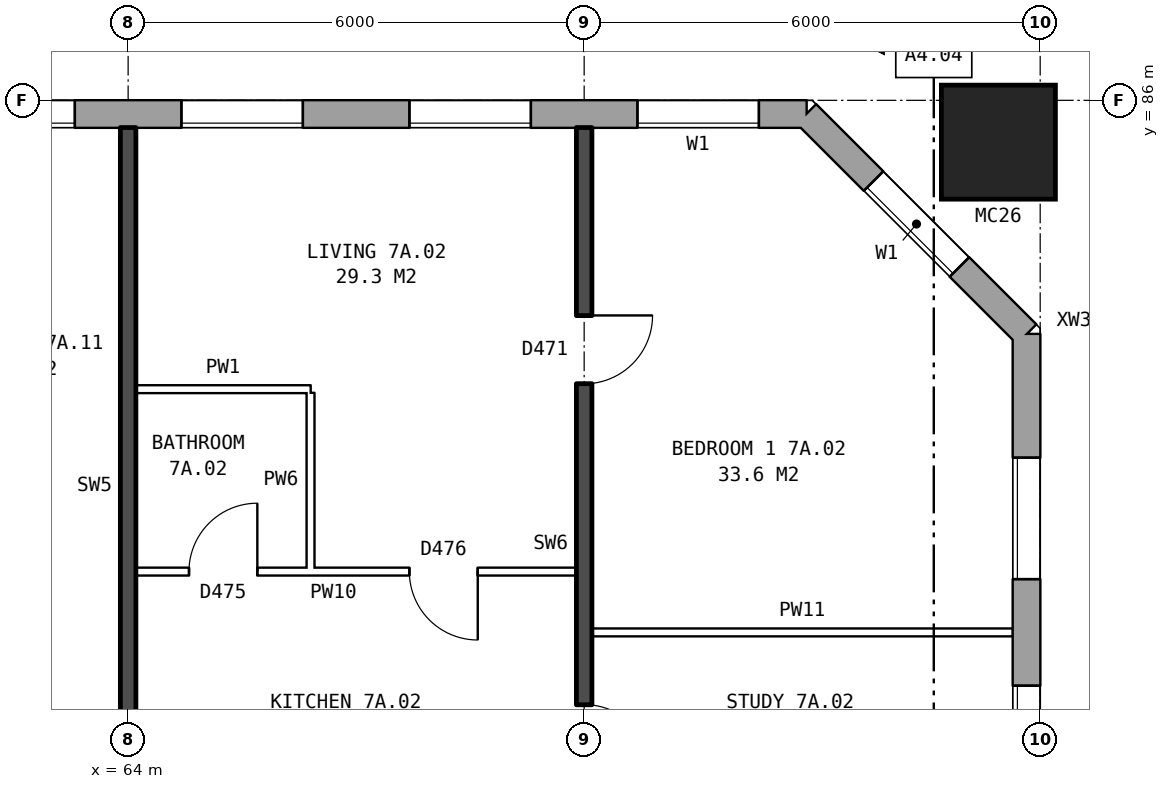
"""IFC4 building model, lengths in metres.
Left out: names, types, materials, properties, quantities, classifications, styles, units other than length and angle.
Written with IfcOpenShell. Run it as: python <this file> out.ifc"""

import sys

from ifc_helpers import new_model, si_unit, direction, frame, frame_2d, origin, origin_2d, place, context, subcontext, project, spatial, rectangle, hollow_rectangle, extrude, element, fill, save


model = new_model("IFC4")
c1 = context("Model", 3, precision=1e-05, world=origin(), true_north=direction((0.0, 1.0)))
c2 = subcontext(c1, "Body", "Model", "MODEL_VIEW")
j1 = project(units=[si_unit("LENGTHUNIT", "METRE"), si_unit("PLANEANGLEUNIT", "RADIAN")], contexts=[c1])
p1 = place(None, origin())
s1 = spatial("IfcSite", under=j1, at=p1, CompositionType="ELEMENT")
p2 = place(p1, origin())
s2 = spatial("IfcBuilding", under=s1, at=p2, CompositionType="ELEMENT")
p3 = place(p2, frame((0.0, 0.0, 28.8)))
s3 = spatial("IfcBuildingStorey", under=s2, at=p3, CompositionType="ELEMENT", Elevation=28.8)
p4 = place(p3, frame((75.45, 85.45, 0.0), z_axis=(0.0, 0.0, 1.0), x_axis=(1.0, 0.0, 0.0)))
e1 = element("IfcColumn", 1, at=p4, inside=s3, PredefinedType="COLUMN", context=c2, shape_type="SweptSolid", body=[
    extrude(hollow_rectangle(XDim=1.5, YDim=1.5, WallThickness=0.08, at=origin_2d()), origin(), (0.0, 0.0, 1.0), 3.1),
])
p5 = place(p3, frame((75.82, 57.075, 0.0), z_axis=(0.0, 0.0, 1.0), x_axis=(0.0, 1.0, 0.0)))
e2 = element("IfcWall", 2, at=p5, inside=s3, PredefinedType="STANDARD", context=c2, shape_type="SweptSolid", body=[
    extrude(rectangle(XDim=25.851, YDim=0.36, at=frame_2d((12.925, 0.0))), origin(), (0.0, 0.0, 1.0), 2.85),
])
p6 = place(p5, frame((1.625, 0.0, 0.8)))
e3 = element("IfcOpeningElement", 3, at=p6, cuts=e2, PredefinedType="OPENING", context=c2, shape_type="SweptSolid", body=[
    extrude(rectangle(XDim=1.6, YDim=1.8, at=frame_2d((0.8, 0.9))), frame((0.0, 0.19, 0.0), z_axis=(0.0, -1.0, 0.0), x_axis=(1.0, 0.0, 0.0)), (0.0, 0.0, 1.0), 0.38),
])
p7 = place(p5, frame((4.625, 0.0, 0.8)))
e4 = element("IfcOpeningElement", 4, at=p7, cuts=e2, PredefinedType="OPENING", context=c2, shape_type="SweptSolid", body=[
    extrude(rectangle(XDim=1.6, YDim=1.8, at=frame_2d((0.8, 0.9))), frame((0.0, 0.19, 0.0), z_axis=(0.0, -1.0, 0.0), x_axis=(1.0, 0.0, 0.0)), (0.0, 0.0, 1.0), 0.38),
])
p8 = place(p5, frame((19.625, 0.0, 0.8)))
e5 = element("IfcOpeningElement", 5, at=p8, cuts=e2, PredefinedType="OPENING", context=c2, shape_type="SweptSolid", body=[
    extrude(rectangle(XDim=1.6, YDim=1.8, at=frame_2d((0.8, 0.9))), frame((0.0, 0.19, 0.0), z_axis=(0.0, -1.0, 0.0), x_axis=(1.0, 0.0, 0.0)), (0.0, 0.0, 1.0), 0.38),
])
p9 = place(p5, frame((22.625, 0.0, 0.8)))
e6 = element("IfcOpeningElement", 6, at=p9, cuts=e2, PredefinedType="OPENING", context=c2, shape_type="SweptSolid", body=[
    extrude(rectangle(XDim=1.6, YDim=1.8, at=frame_2d((0.8, 0.9))), frame((0.0, 0.19, 0.0), z_axis=(0.0, -1.0, 0.0), x_axis=(1.0, 0.0, 0.0)), (0.0, 0.0, 1.0), 0.38),
])
p10 = place(p3, frame((75.82, 82.925, 0.0), z_axis=(0.0, 0.0, 1.0), x_axis=(-0.707106781187, 0.707106781187, 0.0)))
e7 = element("IfcWall", 7, at=p10, inside=s3, PredefinedType="STANDARD", context=c2, shape_type="SweptSolid", body=[
    extrude(rectangle(XDim=4.094, YDim=0.36, at=frame_2d((2.047, 0.0))), origin(), (0.0, 0.0, 1.0), 2.85),
])
p11 = place(p10, frame((1.247, 0.0, 0.8)))
e8 = element("IfcOpeningElement", 8, at=p11, cuts=e7, PredefinedType="OPENING", context=c2, shape_type="SweptSolid", body=[
    extrude(rectangle(XDim=1.6, YDim=1.8, at=frame_2d((0.8, 0.9))), frame((0.0, 0.19, 0.0), z_axis=(0.0, -1.0, 0.0), x_axis=(1.0, 0.0, 0.0)), (0.0, 0.0, 1.0), 0.38),
])
p12 = place(p3, frame((72.925, 85.82, 0.0), z_axis=(0.0, 0.0, 1.0), x_axis=(-1.0, 0.0, 0.0)))
e9 = element("IfcWall", 9, at=p12, inside=s3, PredefinedType="STANDARD", context=c2, shape_type="SweptSolid", body=[
    extrude(rectangle(XDim=50.101, YDim=0.36, at=frame_2d((25.05, 0.0))), origin(), (0.0, 0.0, 1.0), 2.85),
])
p13 = place(p12, frame((0.625, 0.0, 0.8)))
e10 = element("IfcOpeningElement", 10, at=p13, cuts=e9, PredefinedType="OPENING", context=c2, shape_type="SweptSolid", body=[
    extrude(rectangle(XDim=1.6, YDim=1.8, at=frame_2d((0.8, 0.9))), frame((0.0, 0.19, 0.0), z_axis=(0.0, -1.0, 0.0), x_axis=(1.0, 0.0, 0.0)), (0.0, 0.0, 1.0), 0.38),
])
p14 = place(p12, frame((3.625, 0.0, 0.8)))
e11 = element("IfcOpeningElement", 11, at=p14, cuts=e9, PredefinedType="OPENING", context=c2, shape_type="SweptSolid", body=[
    extrude(rectangle(XDim=1.6, YDim=1.8, at=frame_2d((0.8, 0.9))), frame((0.0, 0.19, 0.0), z_axis=(0.0, -1.0, 0.0), x_axis=(1.0, 0.0, 0.0)), (0.0, 0.0, 1.0), 0.38),
])
p15 = place(p12, frame((6.625, 0.0, 0.8)))
e12 = element("IfcOpeningElement", 12, at=p15, cuts=e9, PredefinedType="OPENING", context=c2, shape_type="SweptSolid", body=[
    extrude(rectangle(XDim=1.6, YDim=1.8, at=frame_2d((0.8, 0.9))), frame((0.0, 0.19, 0.0), z_axis=(0.0, -1.0, 0.0), x_axis=(1.0, 0.0, 0.0)), (0.0, 0.0, 1.0), 0.38),
])
p16 = place(p12, frame((9.625, 0.0, 0.8)))
e13 = element("IfcOpeningElement", 13, at=p16, cuts=e9, PredefinedType="OPENING", context=c2, shape_type="SweptSolid", body=[
    extrude(rectangle(XDim=1.6, YDim=1.8, at=frame_2d((0.8, 0.9))), frame((0.0, 0.19, 0.0), z_axis=(0.0, -1.0, 0.0), x_axis=(1.0, 0.0, 0.0)), (0.0, 0.0, 1.0), 0.38),
])
p17 = place(p12, frame((12.075, 0.0, 1.65)))
e14 = element("IfcOpeningElement", 14, at=p17, cuts=e9, PredefinedType="OPENING", context=c2, shape_type="SweptSolid", body=[
    extrude(rectangle(XDim=1.2, YDim=0.9, at=frame_2d((0.6, 0.45))), frame((0.0, 0.19, 0.0), z_axis=(0.0, -1.0, 0.0), x_axis=(1.0, 0.0, 0.0)), (0.0, 0.0, 1.0), 0.38),
])
p18 = place(p12, frame((15.325, 0.0, 0.8)))
e15 = element("IfcOpeningElement", 15, at=p18, cuts=e9, PredefinedType="OPENING", context=c2, shape_type="SweptSolid", body=[
    extrude(rectangle(XDim=0.6, YDim=1.2, at=frame_2d((0.3, 0.6))), frame((0.0, 0.19, 0.0), z_axis=(0.0, -1.0, 0.0), x_axis=(1.0, 0.0, 0.0)), (0.0, 0.0, 1.0), 0.38),
])
p19 = place(p12, frame((18.625, 0.0, 0.8)))
e16 = element("IfcOpeningElement", 16, at=p19, cuts=e9, PredefinedType="OPENING", context=c2, shape_type="SweptSolid", body=[
    extrude(rectangle(XDim=1.6, YDim=1.8, at=frame_2d((0.8, 0.9))), frame((0.0, 0.19, 0.0), z_axis=(0.0, -1.0, 0.0), x_axis=(1.0, 0.0, 0.0)), (0.0, 0.0, 1.0), 0.38),
])
p20 = place(p12, frame((21.625, 0.0, 0.8)))
e17 = element("IfcOpeningElement", 17, at=p20, cuts=e9, PredefinedType="OPENING", context=c2, shape_type="SweptSolid", body=[
    extrude(rectangle(XDim=1.6, YDim=1.8, at=frame_2d((0.8, 0.9))), frame((0.0, 0.19, 0.0), z_axis=(0.0, -1.0, 0.0), x_axis=(1.0, 0.0, 0.0)), (0.0, 0.0, 1.0), 0.38),
])
p21 = place(p12, frame((24.625, 0.0, 0.8)))
e18 = element("IfcOpeningElement", 18, at=p21, cuts=e9, PredefinedType="OPENING", context=c2, shape_type="SweptSolid", body=[
    extrude(rectangle(XDim=1.6, YDim=1.8, at=frame_2d((0.8, 0.9))), frame((0.0, 0.19, 0.0), z_axis=(0.0, -1.0, 0.0), x_axis=(1.0, 0.0, 0.0)), (0.0, 0.0, 1.0), 0.38),
])
p22 = place(p12, frame((27.625, 0.0, 0.8)))
e19 = element("IfcOpeningElement", 19, at=p22, cuts=e9, PredefinedType="OPENING", context=c2, shape_type="SweptSolid", body=[
    extrude(rectangle(XDim=1.6, YDim=1.8, at=frame_2d((0.8, 0.9))), frame((0.0, 0.19, 0.0), z_axis=(0.0, -1.0, 0.0), x_axis=(1.0, 0.0, 0.0)), (0.0, 0.0, 1.0), 0.38),
])
p23 = place(p12, frame((30.625, 0.0, 0.8)))
e20 = element("IfcOpeningElement", 20, at=p23, cuts=e9, PredefinedType="OPENING", context=c2, shape_type="SweptSolid", body=[
    extrude(rectangle(XDim=1.6, YDim=1.8, at=frame_2d((0.8, 0.9))), frame((0.0, 0.19, 0.0), z_axis=(0.0, -1.0, 0.0), x_axis=(1.0, 0.0, 0.0)), (0.0, 0.0, 1.0), 0.38),
])
p24 = place(p12, frame((33.125, 0.0, 0.8)))
e21 = element("IfcOpeningElement", 21, at=p24, cuts=e9, PredefinedType="OPENING", context=c2, shape_type="SweptSolid", body=[
    extrude(rectangle(XDim=1.2, YDim=1.5, at=frame_2d((0.6, 0.75))), frame((0.0, 0.19, 0.0), z_axis=(0.0, -1.0, 0.0), x_axis=(1.0, 0.0, 0.0)), (0.0, 0.0, 1.0), 0.38),
])
p25 = place(p12, frame((36.675, 0.0, 1.7)))
e22 = element("IfcOpeningElement", 22, at=p25, cuts=e9, PredefinedType="OPENING", context=c2, shape_type="SweptSolid", body=[
    extrude(rectangle(XDim=0.6, YDim=0.9, at=frame_2d((0.3, 0.45))), frame((0.0, 0.19, 0.0), z_axis=(0.0, -1.0, 0.0), x_axis=(1.0, 0.0, 0.0)), (0.0, 0.0, 1.0), 0.38),
])
p26 = place(p12, frame((39.625, 0.0, 0.8)))
e23 = element("IfcOpeningElement", 23, at=p26, cuts=e9, PredefinedType="OPENING", context=c2, shape_type="SweptSolid", body=[
    extrude(rectangle(XDim=1.6, YDim=1.8, at=frame_2d((0.8, 0.9))), frame((0.0, 0.19, 0.0), z_axis=(0.0, -1.0, 0.0), x_axis=(1.0, 0.0, 0.0)), (0.0, 0.0, 1.0), 0.38),
])
p27 = place(p12, frame((42.625, 0.0, 0.8)))
e24 = element("IfcOpeningElement", 24, at=p27, cuts=e9, PredefinedType="OPENING", context=c2, shape_type="SweptSolid", body=[
    extrude(rectangle(XDim=1.6, YDim=1.8, at=frame_2d((0.8, 0.9))), frame((0.0, 0.19, 0.0), z_axis=(0.0, -1.0, 0.0), x_axis=(1.0, 0.0, 0.0)), (0.0, 0.0, 1.0), 0.38),
])
p28 = place(p12, frame((45.625, 0.0, 0.8)))
e25 = element("IfcOpeningElement", 25, at=p28, cuts=e9, PredefinedType="OPENING", context=c2, shape_type="SweptSolid", body=[
    extrude(rectangle(XDim=1.6, YDim=1.8, at=frame_2d((0.8, 0.9))), frame((0.0, 0.19, 0.0), z_axis=(0.0, -1.0, 0.0), x_axis=(1.0, 0.0, 0.0)), (0.0, 0.0, 1.0), 0.38),
])
p29 = place(p12, frame((13.875, 0.0, 0.15)))
e26 = element("IfcOpeningElement", 26, at=p29, cuts=e9, PredefinedType="OPENING", context=c2, shape_type="SweptSolid", body=[
    extrude(rectangle(XDim=0.8, YDim=0.9, at=frame_2d((0.4, 0.45))), frame((0.0, 0.19, 0.0), z_axis=(0.0, -1.0, 0.0), x_axis=(1.0, 0.0, 0.0)), (0.0, 0.0, 1.0), 0.38),
])
p30 = place(p12, frame((16.225, 0.0, 0.8)))
e27 = element("IfcOpeningElement", 27, at=p30, cuts=e9, PredefinedType="OPENING", context=c2, shape_type="SweptSolid", body=[
    extrude(rectangle(XDim=1.4, YDim=1.8, at=frame_2d((0.7, 0.9))), frame((0.0, 0.19, 0.0), z_axis=(0.0, -1.0, 0.0), x_axis=(1.0, 0.0, 0.0)), (0.0, 0.0, 1.0), 0.38),
])
p31 = place(p12, frame((34.625, 0.0, 0.8)))
e28 = element("IfcOpeningElement", 28, at=p31, cuts=e9, PredefinedType="OPENING", context=c2, shape_type="SweptSolid", body=[
    extrude(rectangle(XDim=0.6, YDim=0.9, at=frame_2d((0.3, 0.45))), frame((0.0, 0.19, 0.0), z_axis=(0.0, -1.0, 0.0), x_axis=(1.0, 0.0, 0.0)), (0.0, 0.0, 1.0), 0.38),
])
p32 = place(p12, frame((37.575, 0.0, 1.1)))
e29 = element("IfcOpeningElement", 29, at=p32, cuts=e9, PredefinedType="OPENING", context=c2, shape_type="SweptSolid", body=[
    extrude(rectangle(XDim=1.0, YDim=1.5, at=frame_2d((0.5, 0.75))), frame((0.0, 0.19, 0.0), z_axis=(0.0, -1.0, 0.0), x_axis=(1.0, 0.0, 0.0)), (0.0, 0.0, 1.0), 0.38),
])
p33 = place(p3, frame((70.1, 79.0, 0.0), z_axis=(0.0, 0.0, 1.0), x_axis=(1.0, 0.0, 0.0)))
e30 = element("IfcWall", 30, at=p33, inside=s3, PredefinedType="PARTITIONING", context=c2, shape_type="SweptSolid", body=[
    extrude(rectangle(XDim=5.54, YDim=0.1, at=frame_2d((2.77, 0.0))), origin(), (0.0, 0.0, 1.0), 2.85),
])
p34 = place(p3, frame((64.1, 79.8, 0.0), z_axis=(0.0, 0.0, 1.0), x_axis=(1.0, 0.0, 0.0)))
e31 = element("IfcWall", 31, at=p34, inside=s3, PredefinedType="PARTITIONING", context=c2, shape_type="SweptSolid", body=[
    extrude(rectangle(XDim=5.8, YDim=0.1, at=frame_2d((2.9, 0.0))), origin(), (0.0, 0.0, 1.0), 2.85),
])
p35 = place(p34, frame((3.6, 0.0, 0.0)))
e32 = element("IfcOpeningElement", 32, at=p35, cuts=e31, PredefinedType="OPENING", context=c2, shape_type="SweptSolid", body=[
    extrude(rectangle(XDim=0.9, YDim=2.1, at=frame_2d((0.45, 1.05))), frame((0.0, 0.06, 0.0), z_axis=(0.0, -1.0, 0.0), x_axis=(1.0, 0.0, 0.0)), (0.0, 0.0, 1.0), 0.12),
])
p36 = place(p34, frame((0.7, 0.0, 0.0)))
e33 = element("IfcOpeningElement", 33, at=p36, cuts=e31, PredefinedType="OPENING", context=c2, shape_type="SweptSolid", body=[
    extrude(rectangle(XDim=0.9, YDim=2.1, at=frame_2d((0.45, 1.05))), frame((0.0, 0.06, 0.0), z_axis=(0.0, -1.0, 0.0), x_axis=(1.0, 0.0, 0.0)), (0.0, 0.0, 1.0), 0.12),
])
p37 = place(p3, frame((64.1, 82.2, 0.0), z_axis=(0.0, 0.0, 1.0), x_axis=(1.0, 0.0, 0.0)))
e34 = element("IfcWall", 34, at=p37, inside=s3, PredefinedType="PARTITIONING", context=c2, shape_type="SweptSolid", body=[
    extrude(rectangle(XDim=2.3, YDim=0.1, at=frame_2d((1.15, 0.0))), origin(), (0.0, 0.0, 1.0), 2.85),
])
p38 = place(p3, frame((64.0, 76.2, 0.0), z_axis=(0.0, 0.0, 1.0), x_axis=(0.0, 1.0, 0.0)))
e35 = element("IfcWall", 35, at=p38, inside=s3, PredefinedType="SOLIDWALL", context=c2, shape_type="SweptSolid", body=[
    extrude(rectangle(XDim=9.44, YDim=0.2, at=frame_2d((4.72, 0.0))), origin(), (0.0, 0.0, 1.0), 2.85),
])
p39 = place(p3, frame((66.4, 79.85, 0.0), z_axis=(0.0, 0.0, 1.0), x_axis=(0.0, 1.0, 0.0)))
e36 = element("IfcWall", 36, at=p39, inside=s3, PredefinedType="PARTITIONING", context=c2, shape_type="SweptSolid", body=[
    extrude(rectangle(XDim=2.3, YDim=0.1, at=frame_2d((1.15, 0.0))), origin(), (0.0, 0.0, 1.0), 2.85),
])
p40 = place(p3, frame((70.0, 76.2, 0.0), z_axis=(0.0, 0.0, 1.0), x_axis=(0.0, 1.0, 0.0)))
e37 = element("IfcWall", 37, at=p40, inside=s3, PredefinedType="SOLIDWALL", context=c2, shape_type="SweptSolid", body=[
    extrude(rectangle(XDim=9.44, YDim=0.2, at=frame_2d((4.72, 0.0))), origin(), (0.0, 0.0, 1.0), 2.85),
])
p41 = place(p40, frame((6.07, 0.0, 0.0)))
e38 = element("IfcOpeningElement", 38, at=p41, cuts=e37, PredefinedType="OPENING", context=c2, shape_type="SweptSolid", body=[
    extrude(rectangle(XDim=0.9, YDim=2.1, at=frame_2d((0.45, 1.05))), frame((0.0, 0.11, 0.0), z_axis=(0.0, -1.0, 0.0), x_axis=(1.0, 0.0, 0.0)), (0.0, 0.0, 1.0), 0.22),
])
p42 = place(p40, frame((0.95, 0.0, 0.0)))
e39 = element("IfcOpeningElement", 39, at=p42, cuts=e37, PredefinedType="OPENING", context=c2, shape_type="SweptSolid", body=[
    extrude(rectangle(XDim=0.9, YDim=2.1, at=frame_2d((0.45, 1.05))), frame((0.0, 0.11, 0.0), z_axis=(0.0, -1.0, 0.0), x_axis=(1.0, 0.0, 0.0)), (0.0, 0.0, 1.0), 0.22),
])
p43 = place(p8, origin())
e40 = element("IfcWindow", 40, at=p43, inside=s3, PartitioningType="SINGLE_PANEL", PredefinedType="WINDOW", context=c2, shape_type="SweptSolid", body=[
    extrude(rectangle(XDim=1.6, YDim=1.8, at=frame_2d((0.8, 0.9))), frame((0.0, 0.15, 0.0), z_axis=(0.0, -1.0, 0.0), x_axis=(1.0, 0.0, 0.0)), (0.0, 0.0, 1.0), 0.06),
])
fill(e5, e40)
p44 = place(p9, origin())
e41 = element("IfcWindow", 41, at=p44, inside=s3, PartitioningType="SINGLE_PANEL", PredefinedType="WINDOW", context=c2, shape_type="SweptSolid", body=[
    extrude(rectangle(XDim=1.6, YDim=1.8, at=frame_2d((0.8, 0.9))), frame((0.0, 0.15, 0.0), z_axis=(0.0, -1.0, 0.0), x_axis=(1.0, 0.0, 0.0)), (0.0, 0.0, 1.0), 0.06),
])
fill(e6, e41)
p45 = place(p11, origin())
e42 = element("IfcWindow", 42, at=p45, inside=s3, PartitioningType="SINGLE_PANEL", PredefinedType="WINDOW", context=c2, shape_type="SweptSolid", body=[
    extrude(rectangle(XDim=1.6, YDim=1.8, at=frame_2d((0.8, 0.9))), frame((0.0, 0.15, 0.0), z_axis=(0.0, -1.0, 0.0), x_axis=(1.0, 0.0, 0.0)), (0.0, 0.0, 1.0), 0.06),
])
fill(e8, e42)
p46 = place(p13, origin())
e43 = element("IfcWindow", 43, at=p46, inside=s3, PartitioningType="SINGLE_PANEL", PredefinedType="WINDOW", context=c2, shape_type="SweptSolid", body=[
    extrude(rectangle(XDim=1.6, YDim=1.8, at=frame_2d((0.8, 0.9))), frame((0.0, 0.15, 0.0), z_axis=(0.0, -1.0, 0.0), x_axis=(1.0, 0.0, 0.0)), (0.0, 0.0, 1.0), 0.06),
])
fill(e10, e43)
p47 = place(p14, origin())
e44 = element("IfcWindow", 44, at=p47, inside=s3, PartitioningType="SINGLE_PANEL", PredefinedType="WINDOW", context=c2, shape_type="SweptSolid", body=[
    extrude(rectangle(XDim=1.6, YDim=1.8, at=frame_2d((0.8, 0.9))), frame((0.0, 0.15, 0.0), z_axis=(0.0, -1.0, 0.0), x_axis=(1.0, 0.0, 0.0)), (0.0, 0.0, 1.0), 0.06),
])
fill(e11, e44)
p48 = place(p15, origin())
e45 = element("IfcWindow", 45, at=p48, inside=s3, PartitioningType="SINGLE_PANEL", PredefinedType="WINDOW", context=c2, shape_type="SweptSolid", body=[
    extrude(rectangle(XDim=1.6, YDim=1.8, at=frame_2d((0.8, 0.9))), frame((0.0, 0.15, 0.0), z_axis=(0.0, -1.0, 0.0), x_axis=(1.0, 0.0, 0.0)), (0.0, 0.0, 1.0), 0.06),
])
fill(e12, e45)
p49 = place(p16, origin())
e46 = element("IfcWindow", 46, at=p49, inside=s3, PartitioningType="SINGLE_PANEL", PredefinedType="WINDOW", context=c2, shape_type="SweptSolid", body=[
    extrude(rectangle(XDim=1.6, YDim=1.8, at=frame_2d((0.8, 0.9))), frame((0.0, 0.15, 0.0), z_axis=(0.0, -1.0, 0.0), x_axis=(1.0, 0.0, 0.0)), (0.0, 0.0, 1.0), 0.06),
])
fill(e13, e46)
p50 = place(p41, frame((0.9, 0.0, 0.0), z_axis=(0.0, 0.0, 1.0), x_axis=(-1.0, 0.0, 0.0)))
e47 = element("IfcDoor", 47, at=p50, inside=s3, OperationType="SINGLE_SWING_LEFT", PredefinedType="DOOR", context=c2, shape_type="SweptSolid", body=[
    extrude(rectangle(XDim=0.9, YDim=2.1, at=frame_2d((0.45, 1.05))), frame((0.0, 0.025, 0.0), z_axis=(0.0, -1.0, 0.0), x_axis=(1.0, 0.0, 0.0)), (0.0, 0.0, 1.0), 0.05),
])
fill(e38, e47)
p51 = place(p42, frame((0.9, 0.0, 0.0), z_axis=(0.0, 0.0, 1.0), x_axis=(-1.0, 0.0, 0.0)))
e48 = element("IfcDoor", 48, at=p51, inside=s3, OperationType="SINGLE_SWING_RIGHT", PredefinedType="DOOR", context=c2, shape_type="SweptSolid", body=[
    extrude(rectangle(XDim=0.9, YDim=2.1, at=frame_2d((0.45, 1.05))), frame((0.0, 0.025, 0.0), z_axis=(0.0, -1.0, 0.0), x_axis=(1.0, 0.0, 0.0)), (0.0, 0.0, 1.0), 0.05),
])
fill(e39, e48)
p52 = place(p35, frame((0.9, 0.0, 0.0), z_axis=(0.0, 0.0, 1.0), x_axis=(-1.0, 0.0, 0.0)))
e49 = element("IfcDoor", 49, at=p52, inside=s3, OperationType="SINGLE_SWING_LEFT", PredefinedType="DOOR", context=c2, shape_type="SweptSolid", body=[
    extrude(rectangle(XDim=0.9, YDim=2.1, at=frame_2d((0.45, 1.05))), frame((0.0, 0.025, 0.0), z_axis=(0.0, -1.0, 0.0), x_axis=(1.0, 0.0, 0.0)), (0.0, 0.0, 1.0), 0.05),
])
fill(e32, e49)
p53 = place(p36, origin())
e50 = element("IfcDoor", 50, at=p53, inside=s3, OperationType="SINGLE_SWING_RIGHT", PredefinedType="DOOR", context=c2, shape_type="SweptSolid", body=[
    extrude(rectangle(XDim=0.9, YDim=2.1, at=frame_2d((0.45, 1.05))), frame((0.0, 0.025, 0.0), z_axis=(0.0, -1.0, 0.0), x_axis=(1.0, 0.0, 0.0)), (0.0, 0.0, 1.0), 0.05),
])
fill(e33, e50)
save(model, sys.argv[1])
